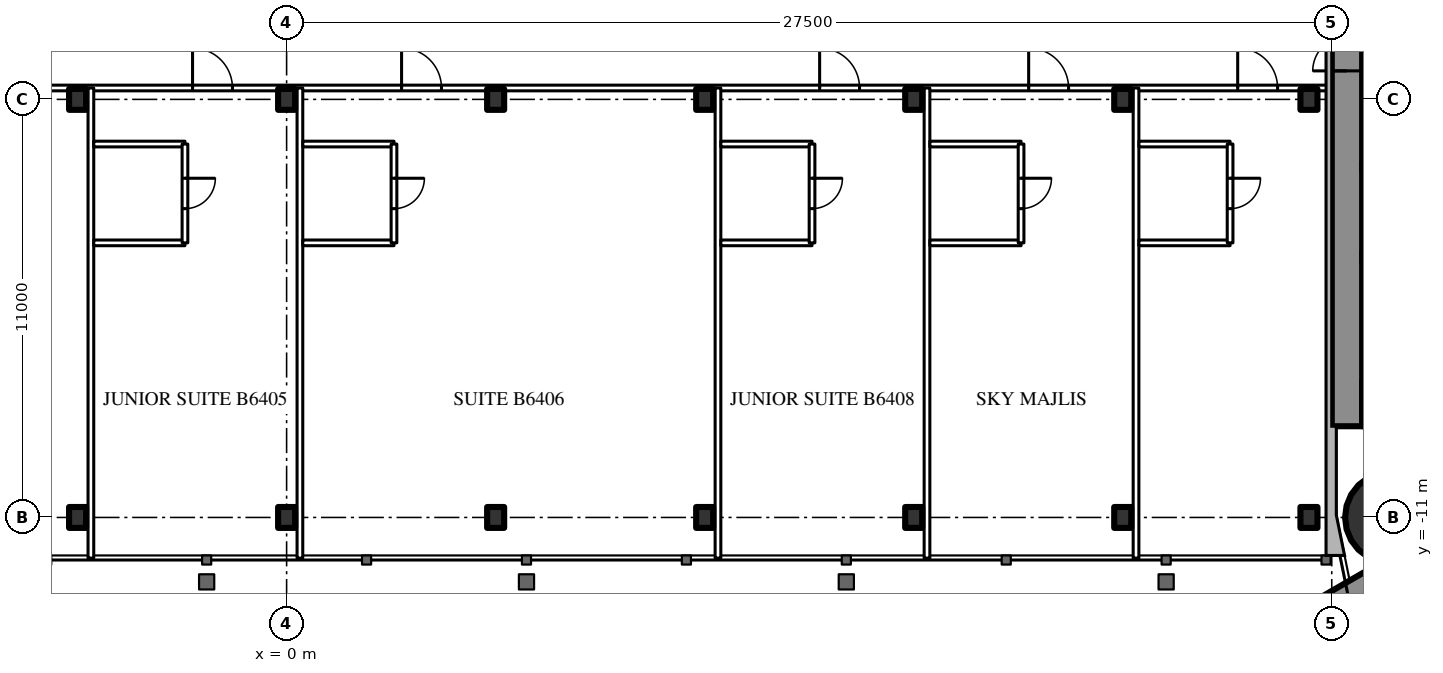
"""IFC4 building model, lengths in metres.
Left out: names, types, materials, properties, quantities, classifications, styles, units other than length and angle.
Written with IfcOpenShell. Run it as: python <this file> out.ifc"""

import sys

from ifc_helpers import new_model, si_unit, direction, frame, frame_2d, origin, origin_2d, place, context, subcontext, project, spatial, rectangle, circle, i_section, extrude, element, fill, save


model = new_model("IFC4")
c1 = context("Model", 3, precision=1e-05, world=origin(), true_north=direction((0.0, 1.0)))
c2 = subcontext(c1, "Body", "Model", "MODEL_VIEW")
j1 = project(units=[si_unit("LENGTHUNIT", "METRE"), si_unit("PLANEANGLEUNIT", "RADIAN")], contexts=[c1])
p1 = place(None, origin())
s1 = spatial("IfcSite", under=j1, at=p1, CompositionType="ELEMENT")
p2 = place(p1, origin())
s2 = spatial("IfcBuilding", under=s1, at=p2, CompositionType="ELEMENT")
p3 = place(p2, frame((0.0, 0.0, 240.5)))
s3 = spatial("IfcBuildingStorey", under=s2, at=p3, CompositionType="ELEMENT", Elevation=240.5)
p4 = place(p3, frame((29.05, -11.0, 0.0), z_axis=(0.0, 0.0, 1.0), x_axis=(1.0, 0.0, 0.0)))
e1 = element("IfcColumn", 1, at=p4, inside=s3, PredefinedType="COLUMN", context=c2, shape_type="SweptSolid", body=[
    extrude(circle(Radius=1.2, at=origin_2d()), origin(), (0.0, 0.0, 1.0), 3.6),
])
p5 = place(p3, frame((27.9, -8.6, 0.0), z_axis=(0.0, 0.0, 1.0), x_axis=(0.0, 1.0, 0.0)))
e2 = element("IfcWall", 2, at=p5, inside=s3, PredefinedType="SHEAR", context=c2, shape_type="SweptSolid", body=[
    extrude(rectangle(XDim=17.2, YDim=0.8, at=frame_2d((8.6, 0.0))), origin(), (0.0, 0.0, 1.0), 3.6),
])
p6 = place(p5, frame((9.35, 0.0, 0.0)))
e3 = element("IfcOpeningElement", 3, at=p6, cuts=e2, PredefinedType="OPENING", context=c2, shape_type="SweptSolid", body=[
    extrude(rectangle(XDim=0.9, YDim=2.2, at=frame_2d((0.45, 1.1))), frame((0.0, 0.41, 0.0), z_axis=(0.0, -1.0, 0.0), x_axis=(1.0, 0.0, 0.0)), (0.0, 0.0, 1.0), 0.82),
])
p7 = place(p3, frame((28.3, -8.0, 0.0), z_axis=(0.0, 0.0, 1.0), x_axis=(1.0, 0.0, 0.0)))
e4 = element("IfcWall", 4, at=p7, inside=s3, PredefinedType="SHEAR", context=c2, shape_type="SweptSolid", body=[
    extrude(rectangle(XDim=8.4, YDim=1.2, at=frame_2d((4.2, 0.0))), origin(), (0.0, 0.0, 1.0), 3.6),
])
p8 = place(p7, frame((0.25, 0.0, 0.0)))
e5 = element("IfcOpeningElement", 5, at=p8, cuts=e4, PredefinedType="OPENING", context=c2, shape_type="SweptSolid", body=[
    extrude(rectangle(XDim=1.0, YDim=2.2, at=frame_2d((0.5, 1.1))), frame((0.0, 0.61, 0.0), z_axis=(0.0, -1.0, 0.0), x_axis=(1.0, 0.0, 0.0)), (0.0, 0.0, 1.0), 1.22),
])
p9 = place(p3, frame((28.3, -4.15, 0.0), z_axis=(0.0, 0.0, 1.0), x_axis=(1.0, 0.0, 0.0)))
e6 = element("IfcWall", 6, at=p9, inside=s3, PredefinedType="SHEAR", context=c2, shape_type="SweptSolid", body=[
    extrude(rectangle(XDim=8.4, YDim=0.3, at=frame_2d((4.2, 0.0))), origin(), (0.0, 0.0, 1.0), 3.6),
])
p10 = place(p3, frame((28.3, -1.775, 0.0), z_axis=(0.0, 0.0, 1.0), x_axis=(1.0, 0.0, 0.0)))
e7 = element("IfcWall", 7, at=p10, inside=s3, PredefinedType="SHEAR", context=c2, shape_type="SweptSolid", body=[
    extrude(rectangle(XDim=2.9, YDim=0.25, at=frame_2d((1.45, 0.0))), origin(), (0.0, 0.0, 1.0), 3.6),
])
p11 = place(p3, frame((27.2, -13.8, 0.0), z_axis=(0.0, 0.0, 1.0), x_axis=(0.866027159892, 0.499996958321, 0.0)))
e8 = element("IfcWall", 8, at=p11, inside=s3, PredefinedType="SHEAR", context=c2, shape_type="SweptSolid", body=[
    extrude(rectangle(XDim=27.947, YDim=1.2, at=frame_2d((13.973, 0.0))), origin(), (0.0, 0.0, 1.0), 3.6),
])
p12 = place(p11, frame((4.6, 0.0, 0.0)))
e9 = element("IfcOpeningElement", 9, at=p12, cuts=e8, PredefinedType="OPENING", context=c2, shape_type="SweptSolid", body=[
    extrude(rectangle(XDim=1.0, YDim=2.2, at=frame_2d((0.5, 1.1))), frame((0.0, 0.61, 0.0), z_axis=(0.0, -1.0, 0.0), x_axis=(1.0, 0.0, 0.0)), (0.0, 0.0, 1.0), 1.22),
])
p13 = place(p11, frame((13.395, 0.0, 0.0)))
e10 = element("IfcOpeningElement", 10, at=p13, cuts=e8, PredefinedType="OPENING", context=c2, shape_type="SweptSolid", body=[
    extrude(rectangle(XDim=1.8, YDim=2.2, at=frame_2d((0.9, 1.1))), frame((0.0, 0.61, 0.0), z_axis=(0.0, -1.0, 0.0), x_axis=(1.0, 0.0, 0.0)), (0.0, 0.0, 1.0), 1.22),
])
p14 = place(p3, frame((27.2, 13.8, 0.0), z_axis=(0.0, 0.0, 1.0), x_axis=(0.866024515034, -0.500001539357, 0.0)))
e11 = element("IfcWall", 11, at=p14, inside=s3, PredefinedType="SHEAR", context=c2, shape_type="SweptSolid", body=[
    extrude(rectangle(XDim=26.907, YDim=1.2, at=frame_2d((13.454, 0.0))), origin(), (0.0, 0.0, 1.0), 3.6),
])
p15 = place(p14, frame((4.6, 0.0, 0.0)))
e12 = element("IfcOpeningElement", 12, at=p15, cuts=e11, PredefinedType="OPENING", context=c2, shape_type="SweptSolid", body=[
    extrude(rectangle(XDim=1.0, YDim=2.2, at=frame_2d((0.5, 1.1))), frame((0.0, 0.61, 0.0), z_axis=(0.0, -1.0, 0.0), x_axis=(1.0, 0.0, 0.0)), (0.0, 0.0, 1.0), 1.22),
])
p16 = place(p14, frame((13.395, 0.0, 0.0)))
e13 = element("IfcOpeningElement", 13, at=p16, cuts=e11, PredefinedType="OPENING", context=c2, shape_type="SweptSolid", body=[
    extrude(rectangle(XDim=1.8, YDim=2.2, at=frame_2d((0.9, 1.1))), frame((0.0, 0.61, 0.0), z_axis=(0.0, -1.0, 0.0), x_axis=(1.0, 0.0, 0.0)), (0.0, 0.0, 1.0), 1.22),
])
for number, where, z_axis, x_axis in (
    (14, (-5.5, -11.0, 0.0), (0.0, 0.0, 1.0), (1.0, 0.0, 0.0)),
    (15, (0.0, -11.0, 0.0), (0.0, 0.0, 1.0), (1.0, 0.0, 0.0)),
    (16, (5.5, -11.0, 0.0), (0.0, 0.0, 1.0), (1.0, 0.0, 0.0)),
    (17, (11.0, -11.0, 0.0), (0.0, 0.0, 1.0), (1.0, 0.0, 0.0)),
    (18, (16.5, -11.0, 0.0), (0.0, 0.0, 1.0), (1.0, 0.0, 0.0)),
    (19, (22.0, -11.0, 0.0), (0.0, 0.0, 1.0), (1.0, 0.0, 0.0)),
    (20, (26.9, -11.0, 0.0), (0.0, 0.0, 1.0), (1.0, 0.0, 0.0)),
    (21, (-5.5, 0.0, 0.0), (0.0, 0.0, 1.0), (1.0, 0.0, 0.0)),
    (22, (0.0, 0.0, 0.0), (0.0, 0.0, 1.0), (1.0, 0.0, 0.0)),
    (23, (5.5, 0.0, 0.0), (0.0, 0.0, 1.0), (1.0, 0.0, 0.0)),
    (24, (11.0, 0.0, 0.0), (0.0, 0.0, 1.0), (1.0, 0.0, 0.0)),
    (25, (16.5, 0.0, 0.0), (0.0, 0.0, 1.0), (1.0, 0.0, 0.0)),
    (26, (22.0, 0.0, 0.0), (0.0, 0.0, 1.0), (1.0, 0.0, 0.0)),
    (27, (26.9, 0.0, 0.0), (0.0, 0.0, 1.0), (1.0, 0.0, 0.0)),
):
    element("IfcColumn", number, at=place(p3, frame(where, z_axis=z_axis, x_axis=x_axis)), inside=s3, PredefinedType="COLUMN", context=c2, shape_type="SweptSolid", body=[
        extrude(i_section(OverallWidth=0.448, OverallDepth=0.55, WebThickness=0.072, FlangeThickness=0.115, FilletRadius=0.02, at=origin_2d()), origin(), (0.0, 0.0, 1.0), 3.6),
    ])
p17 = place(p3, frame((-27.5, 0.3, 0.0), z_axis=(0.0, 0.0, 1.0), x_axis=(1.0, 0.0, 0.0)))
e28 = element("IfcWall", 28, at=p17, inside=s3, PredefinedType="PARTITIONING", context=c2, shape_type="SweptSolid", body=[
    extrude(rectangle(XDim=55.0, YDim=0.15, at=frame_2d((27.5, 0.0))), origin(), (0.0, 0.0, 1.0), 2.4),
])
p18 = place(p17, frame((1.575, 0.0, 0.0)))
e29 = element("IfcOpeningElement", 29, at=p18, cuts=e28, PredefinedType="OPENING", context=c2, shape_type="SweptSolid", body=[
    extrude(rectangle(XDim=1.0, YDim=2.2, at=frame_2d((0.5, 1.1))), frame((0.0, 0.085, 0.0), z_axis=(0.0, -1.0, 0.0), x_axis=(1.0, 0.0, 0.0)), (0.0, 0.0, 1.0), 0.17),
])
p19 = place(p17, frame((8.525, 0.0, 0.0)))
e30 = element("IfcOpeningElement", 30, at=p19, cuts=e28, PredefinedType="OPENING", context=c2, shape_type="SweptSolid", body=[
    extrude(rectangle(XDim=1.05, YDim=2.4, at=frame_2d((0.525, 1.2))), frame((0.0, 0.085, 0.0), z_axis=(0.0, -1.0, 0.0), x_axis=(1.0, 0.0, 0.0)), (0.0, 0.0, 1.0), 0.17),
])
p20 = place(p17, frame((14.025, 0.0, 0.0)))
e31 = element("IfcOpeningElement", 31, at=p20, cuts=e28, PredefinedType="OPENING", context=c2, shape_type="SweptSolid", body=[
    extrude(rectangle(XDim=1.05, YDim=2.4, at=frame_2d((0.525, 1.2))), frame((0.0, 0.085, 0.0), z_axis=(0.0, -1.0, 0.0), x_axis=(1.0, 0.0, 0.0)), (0.0, 0.0, 1.0), 0.17),
])
p21 = place(p17, frame((25.025, 0.0, 0.0)))
e32 = element("IfcOpeningElement", 32, at=p21, cuts=e28, PredefinedType="OPENING", context=c2, shape_type="SweptSolid", body=[
    extrude(rectangle(XDim=1.05, YDim=2.4, at=frame_2d((0.525, 1.2))), frame((0.0, 0.085, 0.0), z_axis=(0.0, -1.0, 0.0), x_axis=(1.0, 0.0, 0.0)), (0.0, 0.0, 1.0), 0.17),
])
p22 = place(p17, frame((30.525, 0.0, 0.0)))
e33 = element("IfcOpeningElement", 33, at=p22, cuts=e28, PredefinedType="OPENING", context=c2, shape_type="SweptSolid", body=[
    extrude(rectangle(XDim=1.05, YDim=2.4, at=frame_2d((0.525, 1.2))), frame((0.0, 0.085, 0.0), z_axis=(0.0, -1.0, 0.0), x_axis=(1.0, 0.0, 0.0)), (0.0, 0.0, 1.0), 0.17),
])
p23 = place(p17, frame((41.525, 0.0, 0.0)))
e34 = element("IfcOpeningElement", 34, at=p23, cuts=e28, PredefinedType="OPENING", context=c2, shape_type="SweptSolid", body=[
    extrude(rectangle(XDim=1.05, YDim=2.4, at=frame_2d((0.525, 1.2))), frame((0.0, 0.085, 0.0), z_axis=(0.0, -1.0, 0.0), x_axis=(1.0, 0.0, 0.0)), (0.0, 0.0, 1.0), 0.17),
])
p24 = place(p17, frame((47.025, 0.0, 0.0)))
e35 = element("IfcOpeningElement", 35, at=p24, cuts=e28, PredefinedType="OPENING", context=c2, shape_type="SweptSolid", body=[
    extrude(rectangle(XDim=1.05, YDim=2.4, at=frame_2d((0.525, 1.2))), frame((0.0, 0.085, 0.0), z_axis=(0.0, -1.0, 0.0), x_axis=(1.0, 0.0, 0.0)), (0.0, 0.0, 1.0), 0.17),
])
p25 = place(p17, frame((52.525, 0.0, 0.0)))
e36 = element("IfcOpeningElement", 36, at=p25, cuts=e28, PredefinedType="OPENING", context=c2, shape_type="SweptSolid", body=[
    extrude(rectangle(XDim=1.05, YDim=2.4, at=frame_2d((0.525, 1.2))), frame((0.0, 0.085, 0.0), z_axis=(0.0, -1.0, 0.0), x_axis=(1.0, 0.0, 0.0)), (0.0, 0.0, 1.0), 0.17),
])
for number, where, z_axis, x_axis in (
    (37, (-5.15, -12.07, 0.0), (0.0, 0.0, 1.0), (0.0, 1.0, 0.0)),
    (38, (0.35, -12.07, 0.0), (0.0, 0.0, 1.0), (0.0, 1.0, 0.0)),
    (39, (11.35, -12.07, 0.0), (0.0, 0.0, 1.0), (0.0, 1.0, 0.0)),
    (40, (16.85, -12.07, 0.0), (0.0, 0.0, 1.0), (0.0, 1.0, 0.0)),
    (41, (22.35, -12.07, 0.0), (0.0, 0.0, 1.0), (0.0, 1.0, 0.0)),
):
    element("IfcWall", number, at=place(p3, frame(where, z_axis=z_axis, x_axis=x_axis)), inside=s3, PredefinedType="PARTITIONING", context=c2, shape_type="SweptSolid", body=[
        extrude(rectangle(XDim=12.37, YDim=0.15, at=frame_2d((6.185, 0.0))), origin(), (0.0, 0.0, 1.0), 3.4),
    ])
for number, where, z_axis, x_axis in (
    (42, (-5.075, -3.775, 0.0), (0.0, 0.0, 1.0), (1.0, 0.0, 0.0)),
    (43, (-5.075, -1.175, 0.0), (0.0, 0.0, 1.0), (1.0, 0.0, 0.0)),
):
    element("IfcWall", number, at=place(p3, frame(where, z_axis=z_axis, x_axis=x_axis)), inside=s3, PredefinedType="PARTITIONING", context=c2, shape_type="SweptSolid", body=[
        extrude(rectangle(XDim=2.4, YDim=0.15, at=frame_2d((1.2, 0.0))), origin(), (0.0, 0.0, 1.0), 3.4),
    ])
p26 = place(p3, frame((-2.675, -3.775, 0.0), z_axis=(0.0, 0.0, 1.0), x_axis=(0.0, 1.0, 0.0)))
e44 = element("IfcWall", 44, at=p26, inside=s3, PredefinedType="PARTITIONING", context=c2, shape_type="SweptSolid", body=[
    extrude(rectangle(XDim=2.6, YDim=0.15, at=frame_2d((1.3, 0.0))), origin(), (0.0, 0.0, 1.0), 3.4),
])
p27 = place(p26, frame((0.9, 0.0, 0.0)))
e45 = element("IfcOpeningElement", 45, at=p27, cuts=e44, PredefinedType="OPENING", context=c2, shape_type="SweptSolid", body=[
    extrude(rectangle(XDim=0.8, YDim=2.2, at=frame_2d((0.4, 1.1))), frame((0.0, 0.085, 0.0), z_axis=(0.0, -1.0, 0.0), x_axis=(1.0, 0.0, 0.0)), (0.0, 0.0, 1.0), 0.17),
])
for number, where, z_axis, x_axis in (
    (46, (0.425, -3.775, 0.0), (0.0, 0.0, 1.0), (1.0, 0.0, 0.0)),
    (47, (0.425, -1.175, 0.0), (0.0, 0.0, 1.0), (1.0, 0.0, 0.0)),
):
    element("IfcWall", number, at=place(p3, frame(where, z_axis=z_axis, x_axis=x_axis)), inside=s3, PredefinedType="PARTITIONING", context=c2, shape_type="SweptSolid", body=[
        extrude(rectangle(XDim=2.4, YDim=0.15, at=frame_2d((1.2, 0.0))), origin(), (0.0, 0.0, 1.0), 3.4),
    ])
p28 = place(p3, frame((2.825, -3.775, 0.0), z_axis=(0.0, 0.0, 1.0), x_axis=(0.0, 1.0, 0.0)))
e48 = element("IfcWall", 48, at=p28, inside=s3, PredefinedType="PARTITIONING", context=c2, shape_type="SweptSolid", body=[
    extrude(rectangle(XDim=2.6, YDim=0.15, at=frame_2d((1.3, 0.0))), origin(), (0.0, 0.0, 1.0), 3.4),
])
p29 = place(p28, frame((0.9, 0.0, 0.0)))
e49 = element("IfcOpeningElement", 49, at=p29, cuts=e48, PredefinedType="OPENING", context=c2, shape_type="SweptSolid", body=[
    extrude(rectangle(XDim=0.8, YDim=2.2, at=frame_2d((0.4, 1.1))), frame((0.0, 0.085, 0.0), z_axis=(0.0, -1.0, 0.0), x_axis=(1.0, 0.0, 0.0)), (0.0, 0.0, 1.0), 0.17),
])
for number, where, z_axis, x_axis in (
    (50, (11.425, -3.775, 0.0), (0.0, 0.0, 1.0), (1.0, 0.0, 0.0)),
    (51, (11.425, -1.175, 0.0), (0.0, 0.0, 1.0), (1.0, 0.0, 0.0)),
):
    element("IfcWall", number, at=place(p3, frame(where, z_axis=z_axis, x_axis=x_axis)), inside=s3, PredefinedType="PARTITIONING", context=c2, shape_type="SweptSolid", body=[
        extrude(rectangle(XDim=2.4, YDim=0.15, at=frame_2d((1.2, 0.0))), origin(), (0.0, 0.0, 1.0), 3.4),
    ])
p30 = place(p3, frame((13.825, -3.775, 0.0), z_axis=(0.0, 0.0, 1.0), x_axis=(0.0, 1.0, 0.0)))
e52 = element("IfcWall", 52, at=p30, inside=s3, PredefinedType="PARTITIONING", context=c2, shape_type="SweptSolid", body=[
    extrude(rectangle(XDim=2.6, YDim=0.15, at=frame_2d((1.3, 0.0))), origin(), (0.0, 0.0, 1.0), 3.4),
])
p31 = place(p30, frame((0.9, 0.0, 0.0)))
e53 = element("IfcOpeningElement", 53, at=p31, cuts=e52, PredefinedType="OPENING", context=c2, shape_type="SweptSolid", body=[
    extrude(rectangle(XDim=0.8, YDim=2.2, at=frame_2d((0.4, 1.1))), frame((0.0, 0.085, 0.0), z_axis=(0.0, -1.0, 0.0), x_axis=(1.0, 0.0, 0.0)), (0.0, 0.0, 1.0), 0.17),
])
for number, where, z_axis, x_axis in (
    (54, (16.925, -3.775, 0.0), (0.0, 0.0, 1.0), (1.0, 0.0, 0.0)),
    (55, (16.925, -1.175, 0.0), (0.0, 0.0, 1.0), (1.0, 0.0, 0.0)),
):
    element("IfcWall", number, at=place(p3, frame(where, z_axis=z_axis, x_axis=x_axis)), inside=s3, PredefinedType="PARTITIONING", context=c2, shape_type="SweptSolid", body=[
        extrude(rectangle(XDim=2.4, YDim=0.15, at=frame_2d((1.2, 0.0))), origin(), (0.0, 0.0, 1.0), 3.4),
    ])
p32 = place(p3, frame((19.325, -3.775, 0.0), z_axis=(0.0, 0.0, 1.0), x_axis=(0.0, 1.0, 0.0)))
e56 = element("IfcWall", 56, at=p32, inside=s3, PredefinedType="PARTITIONING", context=c2, shape_type="SweptSolid", body=[
    extrude(rectangle(XDim=2.6, YDim=0.15, at=frame_2d((1.3, 0.0))), origin(), (0.0, 0.0, 1.0), 3.4),
])
p33 = place(p32, frame((0.9, 0.0, 0.0)))
e57 = element("IfcOpeningElement", 57, at=p33, cuts=e56, PredefinedType="OPENING", context=c2, shape_type="SweptSolid", body=[
    extrude(rectangle(XDim=0.8, YDim=2.2, at=frame_2d((0.4, 1.1))), frame((0.0, 0.085, 0.0), z_axis=(0.0, -1.0, 0.0), x_axis=(1.0, 0.0, 0.0)), (0.0, 0.0, 1.0), 0.17),
])
for number, where, z_axis, x_axis in (
    (58, (22.425, -3.775, 0.0), (0.0, 0.0, 1.0), (1.0, 0.0, 0.0)),
    (59, (22.425, -1.175, 0.0), (0.0, 0.0, 1.0), (1.0, 0.0, 0.0)),
):
    element("IfcWall", number, at=place(p3, frame(where, z_axis=z_axis, x_axis=x_axis)), inside=s3, PredefinedType="PARTITIONING", context=c2, shape_type="SweptSolid", body=[
        extrude(rectangle(XDim=2.4, YDim=0.15, at=frame_2d((1.2, 0.0))), origin(), (0.0, 0.0, 1.0), 3.4),
    ])
p34 = place(p3, frame((24.825, -3.775, 0.0), z_axis=(0.0, 0.0, 1.0), x_axis=(0.0, 1.0, 0.0)))
e60 = element("IfcWall", 60, at=p34, inside=s3, PredefinedType="PARTITIONING", context=c2, shape_type="SweptSolid", body=[
    extrude(rectangle(XDim=2.6, YDim=0.15, at=frame_2d((1.3, 0.0))), origin(), (0.0, 0.0, 1.0), 3.4),
])
p35 = place(p34, frame((0.9, 0.0, 0.0)))
e61 = element("IfcOpeningElement", 61, at=p35, cuts=e60, PredefinedType="OPENING", context=c2, shape_type="SweptSolid", body=[
    extrude(rectangle(XDim=0.8, YDim=2.2, at=frame_2d((0.4, 1.1))), frame((0.0, 0.085, 0.0), z_axis=(0.0, -1.0, 0.0), x_axis=(1.0, 0.0, 0.0)), (0.0, 0.0, 1.0), 0.17),
])
p36 = place(p6, origin())
e62 = element("IfcDoor", 62, at=p36, inside=s3, OperationType="SINGLE_SWING_LEFT", PredefinedType="DOOR", context=c2, shape_type="SweptSolid", body=[
    extrude(rectangle(XDim=0.9, YDim=2.2, at=frame_2d((0.45, 1.1))), frame((0.0, 0.025, 0.0), z_axis=(0.0, -1.0, 0.0), x_axis=(1.0, 0.0, 0.0)), (0.0, 0.0, 1.0), 0.05),
])
fill(e3, e62)
p37 = place(p27, origin())
e63 = element("IfcDoor", 63, at=p37, inside=s3, OperationType="SINGLE_SWING_RIGHT", PredefinedType="DOOR", context=c2, shape_type="SweptSolid", body=[
    extrude(rectangle(XDim=0.8, YDim=2.2, at=frame_2d((0.4, 1.1))), frame((0.0, 0.025, 0.0), z_axis=(0.0, -1.0, 0.0), x_axis=(1.0, 0.0, 0.0)), (0.0, 0.0, 1.0), 0.05),
])
fill(e45, e63)
p38 = place(p21, origin())
e64 = element("IfcDoor", 64, at=p38, inside=s3, OperationType="SINGLE_SWING_LEFT", PredefinedType="DOOR", context=c2, shape_type="SweptSolid", body=[
    extrude(rectangle(XDim=1.05, YDim=2.4, at=frame_2d((0.525, 1.2))), frame((0.0, 0.025, 0.0), z_axis=(0.0, -1.0, 0.0), x_axis=(1.0, 0.0, 0.0)), (0.0, 0.0, 1.0), 0.05),
])
fill(e32, e64)
p39 = place(p29, origin())
e65 = element("IfcDoor", 65, at=p39, inside=s3, OperationType="SINGLE_SWING_RIGHT", PredefinedType="DOOR", context=c2, shape_type="SweptSolid", body=[
    extrude(rectangle(XDim=0.8, YDim=2.2, at=frame_2d((0.4, 1.1))), frame((0.0, 0.025, 0.0), z_axis=(0.0, -1.0, 0.0), x_axis=(1.0, 0.0, 0.0)), (0.0, 0.0, 1.0), 0.05),
])
fill(e49, e65)
p40 = place(p22, origin())
e66 = element("IfcDoor", 66, at=p40, inside=s3, OperationType="SINGLE_SWING_LEFT", PredefinedType="DOOR", context=c2, shape_type="SweptSolid", body=[
    extrude(rectangle(XDim=1.05, YDim=2.4, at=frame_2d((0.525, 1.2))), frame((0.0, 0.025, 0.0), z_axis=(0.0, -1.0, 0.0), x_axis=(1.0, 0.0, 0.0)), (0.0, 0.0, 1.0), 0.05),
])
fill(e33, e66)
p41 = place(p31, origin())
e67 = element("IfcDoor", 67, at=p41, inside=s3, OperationType="SINGLE_SWING_RIGHT", PredefinedType="DOOR", context=c2, shape_type="SweptSolid", body=[
    extrude(rectangle(XDim=0.8, YDim=2.2, at=frame_2d((0.4, 1.1))), frame((0.0, 0.025, 0.0), z_axis=(0.0, -1.0, 0.0), x_axis=(1.0, 0.0, 0.0)), (0.0, 0.0, 1.0), 0.05),
])
fill(e53, e67)
p42 = place(p23, origin())
e68 = element("IfcDoor", 68, at=p42, inside=s3, OperationType="SINGLE_SWING_LEFT", PredefinedType="DOOR", context=c2, shape_type="SweptSolid", body=[
    extrude(rectangle(XDim=1.05, YDim=2.4, at=frame_2d((0.525, 1.2))), frame((0.0, 0.025, 0.0), z_axis=(0.0, -1.0, 0.0), x_axis=(1.0, 0.0, 0.0)), (0.0, 0.0, 1.0), 0.05),
])
fill(e34, e68)
p43 = place(p33, origin())
e69 = element("IfcDoor", 69, at=p43, inside=s3, OperationType="SINGLE_SWING_RIGHT", PredefinedType="DOOR", context=c2, shape_type="SweptSolid", body=[
    extrude(rectangle(XDim=0.8, YDim=2.2, at=frame_2d((0.4, 1.1))), frame((0.0, 0.025, 0.0), z_axis=(0.0, -1.0, 0.0), x_axis=(1.0, 0.0, 0.0)), (0.0, 0.0, 1.0), 0.05),
])
fill(e57, e69)
p44 = place(p24, origin())
e70 = element("IfcDoor", 70, at=p44, inside=s3, OperationType="SINGLE_SWING_LEFT", PredefinedType="DOOR", context=c2, shape_type="SweptSolid", body=[
    extrude(rectangle(XDim=1.05, YDim=2.4, at=frame_2d((0.525, 1.2))), frame((0.0, 0.025, 0.0), z_axis=(0.0, -1.0, 0.0), x_axis=(1.0, 0.0, 0.0)), (0.0, 0.0, 1.0), 0.05),
])
fill(e35, e70)
p45 = place(p35, origin())
e71 = element("IfcDoor", 71, at=p45, inside=s3, OperationType="SINGLE_SWING_RIGHT", PredefinedType="DOOR", context=c2, shape_type="SweptSolid", body=[
    extrude(rectangle(XDim=0.8, YDim=2.2, at=frame_2d((0.4, 1.1))), frame((0.0, 0.025, 0.0), z_axis=(0.0, -1.0, 0.0), x_axis=(1.0, 0.0, 0.0)), (0.0, 0.0, 1.0), 0.05),
])
fill(e61, e71)
p46 = place(p25, origin())
e72 = element("IfcDoor", 72, at=p46, inside=s3, OperationType="SINGLE_SWING_LEFT", PredefinedType="DOOR", context=c2, shape_type="SweptSolid", body=[
    extrude(rectangle(XDim=1.05, YDim=2.4, at=frame_2d((0.525, 1.2))), frame((0.0, 0.025, 0.0), z_axis=(0.0, -1.0, 0.0), x_axis=(1.0, 0.0, 0.0)), (0.0, 0.0, 1.0), 0.05),
])
fill(e36, e72)
save(model, sys.argv[1])
